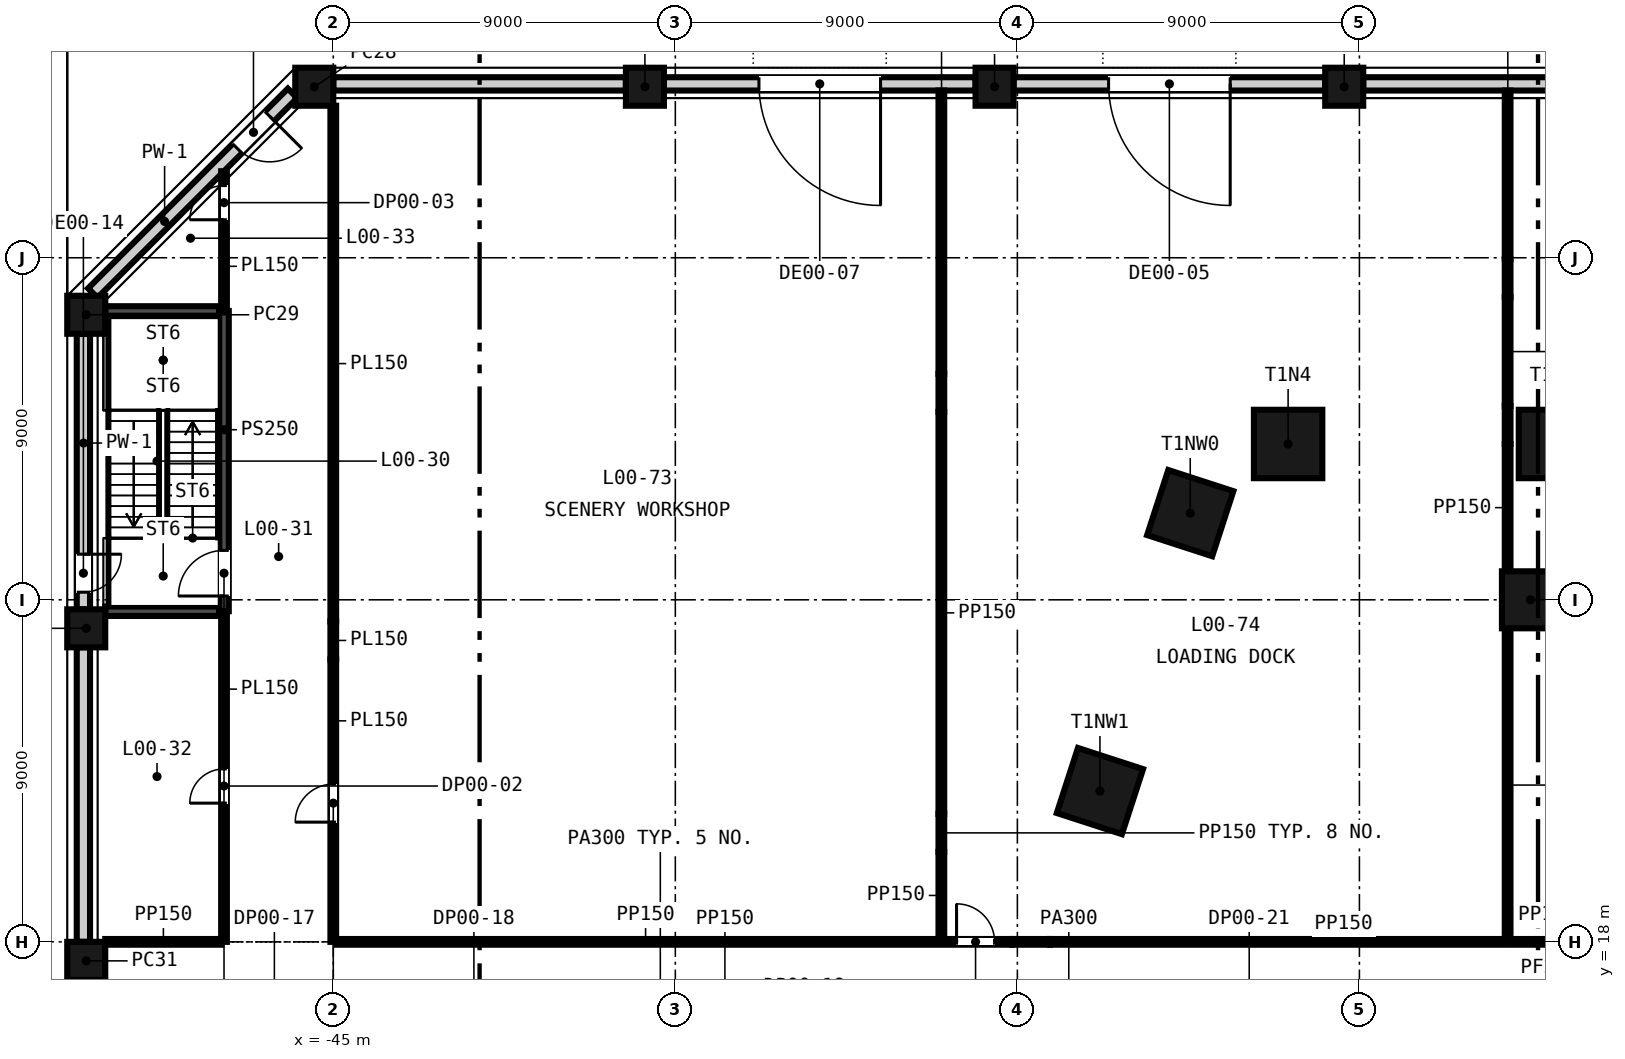
"""IFC4 building model, lengths in metres.
Left out: names, types, materials, properties, quantities, classifications, styles, units other than length and angle.
Written with IfcOpenShell. Run it as: python <this file> out.ifc"""

import sys

from ifc_helpers import new_model, si_unit, direction, frame, frame_2d, origin, origin_2d, place, context, subcontext, project, spatial, rectangle, extrude, element, fill, save


model = new_model("IFC4")
c1 = context("Model", 3, precision=1e-05, world=origin(), true_north=direction((0.0, 1.0)))
c2 = subcontext(c1, "Body", "Model", "MODEL_VIEW")
j1 = project(units=[si_unit("LENGTHUNIT", "METRE"), si_unit("PLANEANGLEUNIT", "RADIAN")], contexts=[c1])
p1 = place(None, origin())
s1 = spatial("IfcSite", under=j1, at=p1, CompositionType="ELEMENT")
p2 = place(p1, origin())
s2 = spatial("IfcBuilding", under=s1, at=p2, CompositionType="ELEMENT")
p3 = place(p2, origin())
s3 = spatial("IfcBuildingStorey", under=s2, at=p3, CompositionType="ELEMENT", Elevation=0.0)
for number, where, z_axis, x_axis in (
    (1, (-12.907, 31.1, -0.3), (0.0, 0.0, 1.0), (-1.0, 0.0, 0.0)),
    (2, (-19.876, 31.1, -0.3), (0.0, 0.0, 1.0), (-1.0, 0.0, 0.0)),
    (3, (-22.451, 29.281, -0.3), (0.0, 0.0, 1.0), (-0.309, -0.951, 0.0)),
    (4, (-24.827, 21.968, -0.3), (0.0, 0.0, 1.0), (-0.309, -0.951, 0.0)),
):
    element("IfcColumn", number, at=place(p3, frame(where, z_axis=z_axis, x_axis=x_axis)), inside=s3, PredefinedType="COLUMN", context=c2, shape_type="SweptSolid", body=[
        extrude(rectangle(XDim=1.8, YDim=1.8, at=origin_2d()), origin(), (0.0, 0.0, 1.0), 8.9),
    ])
p4 = place(p3, frame((-13.5, 27.0, -0.3), z_axis=(0.0, 0.0, 1.0), x_axis=(1.0, 0.0, 0.0)))
e5 = element("IfcColumn", 5, at=p4, inside=s3, PredefinedType="COLUMN", context=c2, shape_type="SweptSolid", body=[
    extrude(rectangle(XDim=1.5, YDim=1.5, at=origin_2d()), origin(), (0.0, 0.0, 1.0), 8.9),
])
for number, where, z_axis, x_axis in (
    (6, (-18.4, 40.5, -0.3), (0.0, 0.0, 1.0), (-1.0, 0.0, 0.0)),
    (7, (-27.6, 40.5, -0.3), (0.0, 0.0, 1.0), (-1.0, 0.0, 0.0)),
    (8, (-36.8, 40.5, -0.3), (0.0, 0.0, 1.0), (-1.0, 0.0, 0.0)),
    (9, (-45.5, 40.5, -0.3), (0.0, 0.0, 1.0), (-1.0, 0.0, 0.0)),
    (10, (-51.5, 34.5, -0.3), (0.0, 0.0, 1.0), (0.0, -1.0, 0.0)),
    (11, (-51.5, 26.25, -0.3), (0.0, 0.0, 1.0), (0.0, -1.0, 0.0)),
    (12, (-51.5, 17.5, -0.3), (0.0, 0.0, 1.0), (0.0, -1.0, 0.0)),
):
    element("IfcColumn", number, at=place(p3, frame(where, z_axis=z_axis, x_axis=x_axis)), inside=s3, PredefinedType="COLUMN", context=c2, shape_type="SweptSolid", body=[
        extrude(rectangle(XDim=1.0, YDim=1.0, at=origin_2d()), origin(), (0.0, 0.0, 1.0), 8.9),
    ])
p5 = place(p3, frame((-9.7, 40.575, -0.3), z_axis=(0.0, 0.0, 1.0), x_axis=(-1.0, 0.0, 0.0)))
e13 = element("IfcWall", 13, at=p5, inside=s3, PredefinedType="SOLIDWALL", context=c2, shape_type="SweptSolid", body=[
    extrude(rectangle(XDim=8.2, YDim=0.35, at=frame_2d((4.1, 0.0))), origin(), (0.0, 0.0, 1.0), 8.0),
])
p6 = place(p5, frame((0.507, 0.0, 0.3)))
e14 = element("IfcOpeningElement", 14, at=p6, cuts=e13, PredefinedType="OPENING", context=c2, shape_type="SweptSolid", body=[
    extrude(rectangle(XDim=1.8, YDim=2.4, at=frame_2d((0.9, 1.2))), frame((0.0, 0.185, 0.0), z_axis=(0.0, -1.0, 0.0), x_axis=(1.0, 0.0, 0.0)), (0.0, 0.0, 1.0), 0.37),
])
p7 = place(p3, frame((-18.9, 40.575, -0.3), z_axis=(0.0, 0.0, 1.0), x_axis=(-1.0, 0.0, 0.0)))
e15 = element("IfcWall", 15, at=p7, inside=s3, PredefinedType="SOLIDWALL", context=c2, shape_type="SweptSolid", body=[
    extrude(rectangle(XDim=8.2, YDim=0.35, at=frame_2d((4.1, 0.0))), origin(), (0.0, 0.0, 1.0), 8.0),
])
p8 = place(p7, frame((2.5, 0.0, 0.3)))
e16 = element("IfcOpeningElement", 16, at=p8, cuts=e15, PredefinedType="OPENING", context=c2, shape_type="SweptSolid", body=[
    extrude(rectangle(XDim=3.2, YDim=4.0, at=frame_2d((1.6, 2.0))), frame((0.0, 0.185, 0.0), z_axis=(0.0, -1.0, 0.0), x_axis=(1.0, 0.0, 0.0)), (0.0, 0.0, 1.0), 0.37),
])
p9 = place(p3, frame((-28.1, 40.575, -0.3), z_axis=(0.0, 0.0, 1.0), x_axis=(-1.0, 0.0, 0.0)))
e17 = element("IfcWall", 17, at=p9, inside=s3, PredefinedType="SOLIDWALL", context=c2, shape_type="SweptSolid", body=[
    extrude(rectangle(XDim=8.2, YDim=0.35, at=frame_2d((4.1, 0.0))), origin(), (0.0, 0.0, 1.0), 8.0),
])
p10 = place(p9, frame((2.5, 0.0, 0.3)))
e18 = element("IfcOpeningElement", 18, at=p10, cuts=e17, PredefinedType="OPENING", context=c2, shape_type="SweptSolid", body=[
    extrude(rectangle(XDim=3.2, YDim=4.0, at=frame_2d((1.6, 2.0))), frame((0.0, 0.185, 0.0), z_axis=(0.0, -1.0, 0.0), x_axis=(1.0, 0.0, 0.0)), (0.0, 0.0, 1.0), 0.37),
])
p11 = place(p3, frame((-37.3, 40.575, -0.3), z_axis=(0.0, 0.0, 1.0), x_axis=(-1.0, 0.0, 0.0)))
e19 = element("IfcWall", 19, at=p11, inside=s3, PredefinedType="SOLIDWALL", context=c2, shape_type="SweptSolid", body=[
    extrude(rectangle(XDim=7.7, YDim=0.35, at=frame_2d((3.85, 0.0))), origin(), (0.0, 0.0, 1.0), 8.0),
])
p12 = place(p3, frame((-46.072, 40.327, -0.3), z_axis=(0.0, 0.0, 1.0), x_axis=(-0.707106781187, -0.707106781187, 0.0)))
e20 = element("IfcWall", 20, at=p12, inside=s3, PredefinedType="SOLIDWALL", context=c2, shape_type="SweptSolid", body=[
    extrude(rectangle(XDim=7.433, YDim=0.35, at=frame_2d((3.716, 0.0))), origin(), (0.0, 0.0, 1.0), 8.0),
])
p13 = place(p12, frame((0.854, 0.0, 0.3)))
e21 = element("IfcOpeningElement", 21, at=p13, cuts=e20, PredefinedType="OPENING", context=c2, shape_type="SweptSolid", body=[
    extrude(rectangle(XDim=1.2, YDim=2.4, at=frame_2d((0.6, 1.2))), frame((0.0, 0.185, 0.0), z_axis=(0.0, -1.0, 0.0), x_axis=(1.0, 0.0, 0.0)), (0.0, 0.0, 1.0), 0.37),
])
p14 = place(p3, frame((-51.575, 34.0, -0.3), z_axis=(0.0, 0.0, 1.0), x_axis=(0.0, -1.0, 0.0)))
e22 = element("IfcWall", 22, at=p14, inside=s3, PredefinedType="SOLIDWALL", context=c2, shape_type="SweptSolid", body=[
    extrude(rectangle(XDim=7.25, YDim=0.35, at=frame_2d((3.625, 0.0))), origin(), (0.0, 0.0, 1.0), 8.0),
])
p15 = place(p14, frame((5.8, 0.0, 0.3)))
e23 = element("IfcOpeningElement", 23, at=p15, cuts=e22, PredefinedType="OPENING", context=c2, shape_type="SweptSolid", body=[
    extrude(rectangle(XDim=1.0, YDim=2.4, at=frame_2d((0.5, 1.2))), frame((0.0, 0.185, 0.0), z_axis=(0.0, -1.0, 0.0), x_axis=(1.0, 0.0, 0.0)), (0.0, 0.0, 1.0), 0.37),
])
p16 = place(p3, frame((-51.575, 25.75, -0.3), z_axis=(0.0, 0.0, 1.0), x_axis=(0.0, -1.0, 0.0)))
e24 = element("IfcWall", 24, at=p16, inside=s3, PredefinedType="SOLIDWALL", context=c2, shape_type="SweptSolid", body=[
    extrude(rectangle(XDim=7.75, YDim=0.35, at=frame_2d((3.875, 0.0))), origin(), (0.0, 0.0, 1.0), 8.0),
])
p17 = place(p3, frame((-51.0, 18.0, 0.0), z_axis=(0.0, 0.0, 1.0), x_axis=(1.0, 0.0, 0.0)))
e25 = element("IfcWall", 25, at=p17, inside=s3, PredefinedType="PARTITIONING", context=c2, shape_type="SweptSolid", body=[
    extrude(rectangle(XDim=3.05, YDim=0.15, at=frame_2d((1.525, 0.0))), origin(), (0.0, 0.0, 1.0), 8.6),
])
p18 = place(p3, frame((-44.925, 18.0, 0.0), z_axis=(0.0, 0.0, 1.0), x_axis=(1.0, 0.0, 0.0)))
e26 = element("IfcWall", 26, at=p18, inside=s3, PredefinedType="PARTITIONING", context=c2, shape_type="SweptSolid", body=[
    extrude(rectangle(XDim=17.783, YDim=0.15, at=frame_2d((8.891, 0.0))), origin(), (0.0, 0.0, 1.0), 8.6),
])
p19 = place(p18, frame((16.325, 0.0, 0.0)))
e27 = element("IfcOpeningElement", 27, at=p19, cuts=e26, PredefinedType="OPENING", context=c2, shape_type="SweptSolid", body=[
    extrude(rectangle(XDim=1.0, YDim=2.1, at=frame_2d((0.5, 1.05))), frame((0.0, 0.085, 0.0), z_axis=(0.0, -1.0, 0.0), x_axis=(1.0, 0.0, 0.0)), (0.0, 0.0, 1.0), 0.17),
])
p20 = place(p3, frame((-27.142, 18.0, 0.0), z_axis=(0.0, 0.0, 1.0), x_axis=(1.0, 0.0, 0.0)))
e28 = element("IfcWall", 28, at=p20, inside=s3, PredefinedType="PARTITIONING", context=c2, shape_type="SweptSolid", body=[
    extrude(rectangle(XDim=1.0, YDim=0.15, at=frame_2d((0.5, 0.0))), origin(), (0.0, 0.0, 1.0), 7.6),
])
p21 = place(p3, frame((-26.142, 18.0, 0.0), z_axis=(0.0, 0.0, 1.0), x_axis=(1.0, 0.0, 0.0)))
e29 = element("IfcWall", 29, at=p21, inside=s3, PredefinedType="PARTITIONING", context=c2, shape_type="SweptSolid", body=[
    extrude(rectangle(XDim=11.967, YDim=0.15, at=frame_2d((5.984, 0.0))), origin(), (0.0, 0.0, 1.0), 8.6),
])
p22 = place(p3, frame((-14.025, 18.0, 0.0), z_axis=(0.0, 0.0, 1.0), x_axis=(1.0, 0.0, 0.0)))
e30 = element("IfcWall", 30, at=p22, inside=s3, PredefinedType="PARTITIONING", context=c2, shape_type="SweptSolid", body=[
    extrude(rectangle(XDim=1.918, YDim=0.15, at=frame_2d((0.959, 0.0))), origin(), (0.0, 0.0, 1.0), 8.6),
])
for number, where, z_axis, x_axis in (
    (31, (-51.0, 26.7, 0.0), (0.0, 0.0, 1.0), (1.0, 0.0, 0.0)),
    (32, (-51.0, 34.6, 0.0), (0.0, 0.0, 1.0), (1.0, 0.0, 0.0)),
):
    element("IfcWall", number, at=place(p3, frame(where, z_axis=z_axis, x_axis=x_axis)), inside=s3, PredefinedType="SHEAR", context=c2, shape_type="SweptSolid", body=[
        extrude(rectangle(XDim=3.0, YDim=0.25, at=frame_2d((1.5, 0.0))), origin(), (0.0, 0.0, 1.0), 8.6),
    ])
p23 = place(p3, frame((-47.875, 18.0, 0.0), z_axis=(0.0, 0.0, 1.0), x_axis=(0.0, 1.0, 0.0)))
e33 = element("IfcWall", 33, at=p23, inside=s3, PredefinedType="PARTITIONING", context=c2, shape_type="SweptSolid", body=[
    extrude(rectangle(XDim=8.7, YDim=0.15, at=frame_2d((4.35, 0.0))), origin(), (0.0, 0.0, 1.0), 8.6),
])
p24 = place(p23, frame((3.65, 0.0, 0.0)))
e34 = element("IfcOpeningElement", 34, at=p24, cuts=e33, PredefinedType="OPENING", context=c2, shape_type="SweptSolid", body=[
    extrude(rectangle(XDim=0.9, YDim=2.1, at=frame_2d((0.45, 1.05))), frame((0.0, 0.085, 0.0), z_axis=(0.0, -1.0, 0.0), x_axis=(1.0, 0.0, 0.0)), (0.0, 0.0, 1.0), 0.17),
])
p25 = place(p3, frame((-47.875, 26.7, 0.0), z_axis=(0.0, 0.0, 1.0), x_axis=(0.0, 1.0, 0.0)))
e35 = element("IfcWall", 35, at=p25, inside=s3, PredefinedType="SHEAR", context=c2, shape_type="SweptSolid", body=[
    extrude(rectangle(XDim=7.9, YDim=0.25, at=frame_2d((3.95, 0.0))), origin(), (0.0, 0.0, 1.0), 8.6),
])
p26 = place(p25, frame((0.4, 0.0, 0.0)))
e36 = element("IfcOpeningElement", 36, at=p26, cuts=e35, PredefinedType="OPENING", context=c2, shape_type="SweptSolid", body=[
    extrude(rectangle(XDim=1.2, YDim=2.1, at=frame_2d((0.6, 1.05))), frame((0.0, 0.135, 0.0), z_axis=(0.0, -1.0, 0.0), x_axis=(1.0, 0.0, 0.0)), (0.0, 0.0, 1.0), 0.27),
])
p27 = place(p3, frame((-47.875, 34.6, 0.0), z_axis=(0.0, 0.0, 1.0), x_axis=(0.0, 1.0, 0.0)))
e37 = element("IfcWall", 37, at=p27, inside=s3, PredefinedType="PARTITIONING", context=c2, shape_type="SweptSolid", body=[
    extrude(rectangle(XDim=3.677, YDim=0.15, at=frame_2d((1.838, 0.0))), origin(), (0.0, 0.0, 1.0), 8.067),
])
p28 = place(p27, frame((2.4, 0.0, 0.0)))
e38 = element("IfcOpeningElement", 38, at=p28, cuts=e37, PredefinedType="OPENING", context=c2, shape_type="SweptSolid", body=[
    extrude(rectangle(XDim=0.9, YDim=2.1, at=frame_2d((0.45, 1.05))), frame((0.0, 0.085, 0.0), z_axis=(0.0, -1.0, 0.0), x_axis=(1.0, 0.0, 0.0)), (0.0, 0.0, 1.0), 0.17),
])
p29 = place(p3, frame((-45.0, 18.0, 0.0), z_axis=(0.0, 0.0, 1.0), x_axis=(0.0, 1.0, 0.0)))
e39 = element("IfcWall", 39, at=p29, inside=s3, PredefinedType="PARTITIONING", context=c2, shape_type="SweptSolid", body=[
    extrude(rectangle(XDim=7.431, YDim=0.15, at=frame_2d((3.715, 0.0))), origin(), (0.0, 0.0, 1.0), 8.6),
])
p30 = place(p29, frame((3.15, 0.0, 0.0)))
e40 = element("IfcOpeningElement", 40, at=p30, cuts=e39, PredefinedType="OPENING", context=c2, shape_type="SweptSolid", body=[
    extrude(rectangle(XDim=1.0, YDim=2.1, at=frame_2d((0.5, 1.05))), frame((0.0, 0.085, 0.0), z_axis=(0.0, -1.0, 0.0), x_axis=(1.0, 0.0, 0.0)), (0.0, 0.0, 1.0), 0.17),
])
p31 = place(p3, frame((-45.0, 25.431, 0.0), z_axis=(0.0, 0.0, 1.0), x_axis=(0.0, 1.0, 0.0)))
e41 = element("IfcWall", 41, at=p31, inside=s3, PredefinedType="PARTITIONING", context=c2, shape_type="SweptSolid", body=[
    extrude(rectangle(XDim=1.0, YDim=0.15, at=frame_2d((0.5, 0.0))), origin(), (0.0, 0.0, 1.0), 7.511),
])
p32 = place(p3, frame((-45.0, 26.431, 0.0), z_axis=(0.0, 0.0, 1.0), x_axis=(0.0, 1.0, 0.0)))
e42 = element("IfcWall", 42, at=p32, inside=s3, PredefinedType="PARTITIONING", context=c2, shape_type="SweptSolid", body=[
    extrude(rectangle(XDim=13.569, YDim=0.15, at=frame_2d((6.785, 0.0))), origin(), (0.0, 0.0, 1.0), 8.6),
])
p33 = place(p3, frame((-29.0, 18.075, 0.0), z_axis=(0.0, 0.0, 1.0), x_axis=(0.0, 1.0, 0.0)))
e43 = element("IfcWall", 43, at=p33, inside=s3, PredefinedType="PARTITIONING", context=c2, shape_type="SweptSolid", body=[
    extrude(rectangle(XDim=2.292, YDim=0.15, at=frame_2d((1.146, 0.0))), origin(), (0.0, 0.0, 1.0), 8.6),
])
p34 = place(p3, frame((-29.0, 20.367, 0.0), z_axis=(0.0, 0.0, 1.0), x_axis=(0.0, 1.0, 0.0)))
e44 = element("IfcWall", 44, at=p34, inside=s3, PredefinedType="PARTITIONING", context=c2, shape_type="SweptSolid", body=[
    extrude(rectangle(XDim=1.0, YDim=0.15, at=frame_2d((0.5, 0.0))), origin(), (0.0, 0.0, 1.0), 7.511),
])
p35 = place(p3, frame((-29.0, 21.367, 0.0), z_axis=(0.0, 0.0, 1.0), x_axis=(0.0, 1.0, 0.0)))
e45 = element("IfcWall", 45, at=p35, inside=s3, PredefinedType="PARTITIONING", context=c2, shape_type="SweptSolid", body=[
    extrude(rectangle(XDim=10.579, YDim=0.15, at=frame_2d((5.29, 0.0))), origin(), (0.0, 0.0, 1.0), 8.6),
])
p36 = place(p3, frame((-29.0, 31.946, 0.0), z_axis=(0.0, 0.0, 1.0), x_axis=(0.0, 1.0, 0.0)))
e46 = element("IfcWall", 46, at=p36, inside=s3, PredefinedType="PARTITIONING", context=c2, shape_type="SweptSolid", body=[
    extrude(rectangle(XDim=1.0, YDim=0.15, at=frame_2d((0.5, 0.0))), origin(), (0.0, 0.0, 1.0), 7.619),
])
p37 = place(p3, frame((-29.0, 32.946, 0.0), z_axis=(0.0, 0.0, 1.0), x_axis=(0.0, 1.0, 0.0)))
e47 = element("IfcWall", 47, at=p37, inside=s3, PredefinedType="PARTITIONING", context=c2, shape_type="SweptSolid", body=[
    extrude(rectangle(XDim=7.454, YDim=0.15, at=frame_2d((3.727, 0.0))), origin(), (0.0, 0.0, 1.0), 8.6),
])
p38 = place(p3, frame((-14.1, 18.001, 0.0), z_axis=(0.0, 0.0, 1.0), x_axis=(0.0, 1.0, 0.0)))
e48 = element("IfcWall", 48, at=p38, inside=s3, PredefinedType="PARTITIONING", context=c2, shape_type="SweptSolid", body=[
    extrude(rectangle(XDim=8.249, YDim=0.15, at=frame_2d((4.125, 0.0))), origin(), (0.0, 0.0, 1.0), 8.6),
])
p39 = place(p3, frame((-14.1, 27.75, 0.0), z_axis=(0.0, 0.0, 1.0), x_axis=(0.0, 1.0, 0.0)))
e49 = element("IfcWall", 49, at=p39, inside=s3, PredefinedType="PARTITIONING", context=c2, shape_type="SweptSolid", body=[
    extrude(rectangle(XDim=3.35, YDim=0.15, at=frame_2d((1.675, 0.0))), origin(), (0.0, 0.0, 1.0), 8.6),
])
p40 = place(p3, frame((-14.1, 31.1, 0.0), z_axis=(0.0, 0.0, 1.0), x_axis=(0.0, 1.0, 0.0)))
e50 = element("IfcWall", 50, at=p40, inside=s3, PredefinedType="PARTITIONING", context=c2, shape_type="SweptSolid", body=[
    extrude(rectangle(XDim=1.0, YDim=0.15, at=frame_2d((0.5, 0.0))), origin(), (0.0, 0.0, 1.0), 7.6),
])
p41 = place(p3, frame((-14.1, 32.1, 0.0), z_axis=(0.0, 0.0, 1.0), x_axis=(0.0, 1.0, 0.0)))
e51 = element("IfcWall", 51, at=p41, inside=s3, PredefinedType="PARTITIONING", context=c2, shape_type="SweptSolid", body=[
    extrude(rectangle(XDim=2.862, YDim=0.15, at=frame_2d((1.431, 0.0))), origin(), (0.0, 0.0, 1.0), 8.6),
])
p42 = place(p3, frame((-14.1, 34.962, 0.0), z_axis=(0.0, 0.0, 1.0), x_axis=(0.0, 1.0, 0.0)))
e52 = element("IfcWall", 52, at=p42, inside=s3, PredefinedType="PARTITIONING", context=c2, shape_type="SweptSolid", body=[
    extrude(rectangle(XDim=1.0, YDim=0.15, at=frame_2d((0.5, 0.0))), origin(), (0.0, 0.0, 1.0), 7.841),
])
p43 = place(p3, frame((-14.1, 35.962, 0.0), z_axis=(0.0, 0.0, 1.0), x_axis=(0.0, 1.0, 0.0)))
e53 = element("IfcWall", 53, at=p43, inside=s3, PredefinedType="PARTITIONING", context=c2, shape_type="SweptSolid", body=[
    extrude(rectangle(XDim=4.438, YDim=0.15, at=frame_2d((2.219, 0.0))), origin(), (0.0, 0.0, 1.0), 8.6),
])
p44 = place(p8, origin())
e54 = element("IfcDoor", 54, at=p44, inside=s3, OperationType="ROLLINGUP", PredefinedType="GATE", context=c2, shape_type="SweptSolid", body=[
    extrude(rectangle(XDim=3.2, YDim=4.0, at=frame_2d((1.6, 2.0))), frame((0.0, 0.025, 0.0), z_axis=(0.0, -1.0, 0.0), x_axis=(1.0, 0.0, 0.0)), (0.0, 0.0, 1.0), 0.05),
])
fill(e16, e54)
p45 = place(p10, origin())
e55 = element("IfcDoor", 55, at=p45, inside=s3, OperationType="ROLLINGUP", PredefinedType="GATE", context=c2, shape_type="SweptSolid", body=[
    extrude(rectangle(XDim=3.2, YDim=4.0, at=frame_2d((1.6, 2.0))), frame((0.0, 0.025, 0.0), z_axis=(0.0, -1.0, 0.0), x_axis=(1.0, 0.0, 0.0)), (0.0, 0.0, 1.0), 0.05),
])
fill(e18, e55)
p46 = place(p15, frame((1.0, 0.0, 0.0), z_axis=(0.0, 0.0, 1.0), x_axis=(-1.0, 0.0, 0.0)))
e56 = element("IfcDoor", 56, at=p46, inside=s3, OperationType="SINGLE_SWING_LEFT", PredefinedType="DOOR", context=c2, shape_type="SweptSolid", body=[
    extrude(rectangle(XDim=1.0, YDim=2.4, at=frame_2d((0.5, 1.2))), frame((0.0, 0.025, 0.0), z_axis=(0.0, -1.0, 0.0), x_axis=(1.0, 0.0, 0.0)), (0.0, 0.0, 1.0), 0.05),
])
fill(e23, e56)
p47 = place(p13, frame((1.2, 0.0, 0.0), z_axis=(0.0, 0.0, 1.0), x_axis=(-1.0, 0.0, 0.0)))
e57 = element("IfcDoor", 57, at=p47, inside=s3, OperationType="SINGLE_SWING_LEFT", PredefinedType="DOOR", context=c2, shape_type="SweptSolid", body=[
    extrude(rectangle(XDim=1.2, YDim=2.4, at=frame_2d((0.6, 1.2))), frame((0.0, 0.025, 0.0), z_axis=(0.0, -1.0, 0.0), x_axis=(1.0, 0.0, 0.0)), (0.0, 0.0, 1.0), 0.05),
])
fill(e21, e57)
p48 = place(p26, origin())
e58 = element("IfcDoor", 58, at=p48, inside=s3, OperationType="SINGLE_SWING_LEFT", PredefinedType="DOOR", context=c2, shape_type="SweptSolid", body=[
    extrude(rectangle(XDim=1.2, YDim=2.1, at=frame_2d((0.6, 1.05))), frame((0.0, 0.025, 0.0), z_axis=(0.0, -1.0, 0.0), x_axis=(1.0, 0.0, 0.0)), (0.0, 0.0, 1.0), 0.05),
])
fill(e36, e58)
p49 = place(p24, origin())
e59 = element("IfcDoor", 59, at=p49, inside=s3, OperationType="SINGLE_SWING_LEFT", PredefinedType="DOOR", context=c2, shape_type="SweptSolid", body=[
    extrude(rectangle(XDim=0.9, YDim=2.1, at=frame_2d((0.45, 1.05))), frame((0.0, 0.025, 0.0), z_axis=(0.0, -1.0, 0.0), x_axis=(1.0, 0.0, 0.0)), (0.0, 0.0, 1.0), 0.05),
])
fill(e34, e59)
p50 = place(p28, origin())
e60 = element("IfcDoor", 60, at=p50, inside=s3, OperationType="SINGLE_SWING_LEFT", PredefinedType="DOOR", context=c2, shape_type="SweptSolid", body=[
    extrude(rectangle(XDim=0.9, YDim=2.1, at=frame_2d((0.45, 1.05))), frame((0.0, 0.025, 0.0), z_axis=(0.0, -1.0, 0.0), x_axis=(1.0, 0.0, 0.0)), (0.0, 0.0, 1.0), 0.05),
])
fill(e38, e60)
p51 = place(p30, origin())
e61 = element("IfcDoor", 61, at=p51, inside=s3, OperationType="SINGLE_SWING_LEFT", PredefinedType="DOOR", context=c2, shape_type="SweptSolid", body=[
    extrude(rectangle(XDim=1.0, YDim=2.1, at=frame_2d((0.5, 1.05))), frame((0.0, 0.025, 0.0), z_axis=(0.0, -1.0, 0.0), x_axis=(1.0, 0.0, 0.0)), (0.0, 0.0, 1.0), 0.05),
])
fill(e40, e61)
p52 = place(p19, origin())
e62 = element("IfcDoor", 62, at=p52, inside=s3, OperationType="SINGLE_SWING_LEFT", PredefinedType="DOOR", context=c2, shape_type="SweptSolid", body=[
    extrude(rectangle(XDim=1.0, YDim=2.1, at=frame_2d((0.5, 1.05))), frame((0.0, 0.025, 0.0), z_axis=(0.0, -1.0, 0.0), x_axis=(1.0, 0.0, 0.0)), (0.0, 0.0, 1.0), 0.05),
])
fill(e27, e62)
save(model, sys.argv[1])
